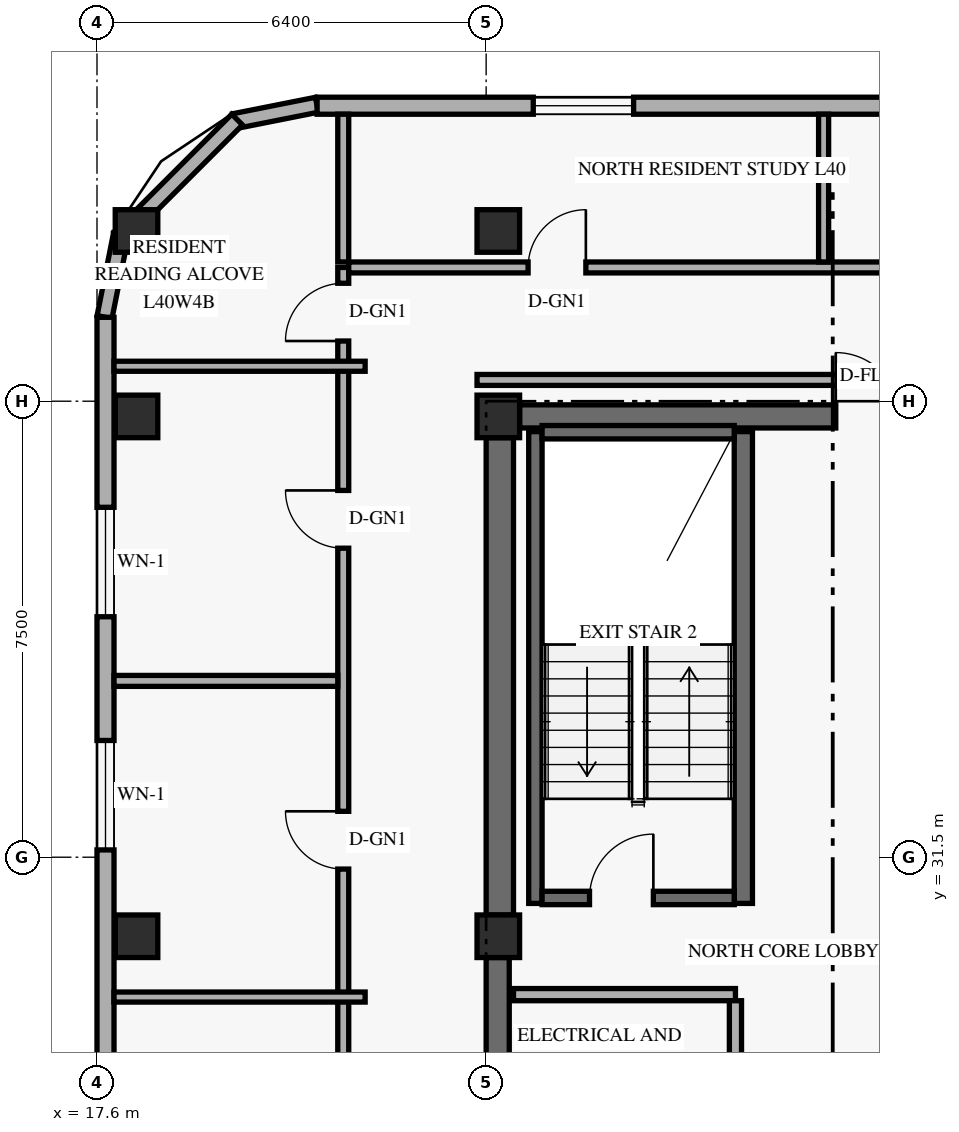
"""IFC4 building model, lengths in metres.
Left out: names, types, materials, properties, quantities, classifications, styles, units other than length and angle.
Written with IfcOpenShell. Run it as: python <this file> out.ifc"""

import sys

from ifc_helpers import new_model, si_unit, direction, frame, frame_2d, origin, origin_2d, place, context, subcontext, project, spatial, rectangle, extrude, element, fill, save


model = new_model("IFC4")
c1 = context("Model", 3, precision=1e-05, world=origin(), true_north=direction((0.0, 1.0)))
c2 = subcontext(c1, "Body", "Model", "MODEL_VIEW")
j1 = project(units=[si_unit("LENGTHUNIT", "METRE"), si_unit("PLANEANGLEUNIT", "RADIAN")], contexts=[c1])
p1 = place(None, origin())
s1 = spatial("IfcSite", under=j1, at=p1, CompositionType="ELEMENT")
p2 = place(p1, origin())
s2 = spatial("IfcBuilding", under=s1, at=p2, CompositionType="ELEMENT")
p3 = place(p2, frame((0.0, 0.0, 155.4)))
s3 = spatial("IfcBuildingStorey", under=s2, at=p3, CompositionType="ELEMENT", Elevation=155.4)
p4 = place(p3, frame((24.19, 17.9, 0.0), z_axis=(0.0, 0.0, 1.0), x_axis=(0.0, 1.0, 0.0)))
e1 = element("IfcWall", 1, at=p4, inside=s3, PredefinedType="SHEAR", context=c2, shape_type="SweptSolid", body=[
    extrude(rectangle(XDim=11.95, YDim=0.38, at=frame_2d((5.975, 0.0))), origin(), (0.0, 0.0, 1.0), 2.748),
])
p5 = place(p3, frame((24.225, 30.55, 0.0), z_axis=(0.0, 0.0, 1.0), x_axis=(0.0, 1.0, 0.0)))
e2 = element("IfcWall", 2, at=p5, inside=s3, PredefinedType="SHEAR", context=c2, shape_type="SweptSolid", body=[
    extrude(rectangle(XDim=7.85, YDim=0.45, at=frame_2d((3.925, 0.0))), origin(), (0.0, 0.0, 1.0), 2.748),
])
p6 = place(p3, frame((24.55, 38.75, 0.0), z_axis=(0.0, 0.0, 1.0), x_axis=(1.0, 0.0, 0.0)))
e3 = element("IfcWall", 3, at=p6, inside=s3, PredefinedType="SHEAR", context=c2, shape_type="SweptSolid", body=[
    extrude(rectangle(XDim=10.3, YDim=0.38, at=frame_2d((5.15, 0.0))), origin(), (0.0, 0.0, 1.0), 3.36),
])
p7 = place(p6, frame((5.2, 0.0, 0.0)))
e4 = element("IfcOpeningElement", 4, at=p7, cuts=e3, PredefinedType="OPENING", context=c2, shape_type="SweptSolid", body=[
    extrude(rectangle(XDim=1.05, YDim=2.15, at=frame_2d((0.525, 1.075))), frame((0.0, 0.2, 0.0), z_axis=(0.0, -1.0, 0.0), x_axis=(1.0, 0.0, 0.0)), (0.0, 0.0, 1.0), 0.4),
])
p8 = place(p3, frame((24.81, 30.74, 0.0), z_axis=(0.0, 0.0, 1.0), x_axis=(0.0, 1.0, 0.0)))
e5 = element("IfcWall", 5, at=p8, inside=s3, PredefinedType="SHEAR", context=c2, shape_type="SweptSolid", body=[
    extrude(rectangle(XDim=7.76, YDim=0.22, at=frame_2d((3.88, 0.0))), origin(), (0.0, 0.0, 1.0), 3.36),
])
p9 = place(p3, frame((28.23, 30.74, 0.0), z_axis=(0.0, 0.0, 1.0), x_axis=(0.0, 1.0, 0.0)))
e6 = element("IfcWall", 6, at=p9, inside=s3, PredefinedType="SHEAR", context=c2, shape_type="SweptSolid", body=[
    extrude(rectangle(XDim=7.76, YDim=0.3, at=frame_2d((3.88, 0.0))), origin(), (0.0, 0.0, 1.0), 3.36),
])
p10 = place(p3, frame((24.92, 30.83, 0.0), z_axis=(0.0, 0.0, 1.0), x_axis=(1.0, 0.0, 0.0)))
e7 = element("IfcWall", 7, at=p10, inside=s3, PredefinedType="SHEAR", context=c2, shape_type="SweptSolid", body=[
    extrude(rectangle(XDim=3.16, YDim=0.22, at=frame_2d((1.58, 0.0))), origin(), (0.0, 0.0, 1.0), 3.36),
])
p11 = place(p10, frame((0.78, 0.0, 0.0)))
e8 = element("IfcOpeningElement", 8, at=p11, cuts=e7, PredefinedType="OPENING", context=c2, shape_type="SweptSolid", body=[
    extrude(rectangle(XDim=1.05, YDim=2.15, at=frame_2d((0.525, 1.075))), frame((0.0, 0.12, 0.0), z_axis=(0.0, -1.0, 0.0), x_axis=(1.0, 0.0, 0.0)), (0.0, 0.0, 1.0), 0.24),
])
p12 = place(p3, frame((24.92, 38.49, 0.0), z_axis=(0.0, 0.0, 1.0), x_axis=(1.0, 0.0, 0.0)))
e9 = element("IfcWall", 9, at=p12, inside=s3, PredefinedType="SHEAR", context=c2, shape_type="SweptSolid", body=[
    extrude(rectangle(XDim=3.16, YDim=0.22, at=frame_2d((1.58, 0.0))), origin(), (0.0, 0.0, 1.0), 3.36),
])
for number, where, z_axis, x_axis in (
    (10, (18.25, 30.2, 0.0), (0.0, 0.0, 1.0), (1.0, 0.0, 0.0)),
    (11, (18.25, 38.75, 0.0), (0.0, 0.0, 1.0), (1.0, 0.0, 0.0)),
    (12, (18.25, 41.8, 0.0), (0.0, 0.0, 1.0), (1.0, 0.0, 0.0)),
    (13, (24.2, 30.2, 0.0), (0.0, 0.0, 1.0), (1.0, 0.0, 0.0)),
    (14, (24.2, 38.75, 0.0), (0.0, 0.0, 1.0), (1.0, 0.0, 0.0)),
    (15, (24.2, 41.8, 0.0), (0.0, 0.0, 1.0), (1.0, 0.0, 0.0)),
):
    element("IfcColumn", number, at=place(p3, frame(where, z_axis=z_axis, x_axis=x_axis)), inside=s3, PredefinedType="COLUMN", context=c2, shape_type="SweptSolid", body=[
        extrude(rectangle(XDim=0.7, YDim=0.7, at=origin_2d()), origin(), (0.0, 0.0, 1.0), 3.6),
    ])
p13 = place(p3, frame((21.217, 43.876, 0.0), z_axis=(0.0, 0.0, 1.0), x_axis=(-0.980809899341, -0.19496651342, 0.0)))
e16 = element("IfcWall", 16, at=p13, inside=s3, PredefinedType="SOLIDWALL", context=c2, shape_type="SweptSolid", body=[
    extrude(rectangle(XDim=1.389, YDim=0.25, at=frame_2d((0.694, 0.0))), origin(), (0.0, 0.0, 1.0), 3.36),
])
p14 = place(p3, frame((19.905, 43.632, 0.0), z_axis=(0.0, 0.0, 1.0), x_axis=(-0.707106781187, -0.707106781187, 0.0)))
e17 = element("IfcWall", 17, at=p14, inside=s3, PredefinedType="SOLIDWALL", context=c2, shape_type="SweptSolid", body=[
    extrude(rectangle(XDim=2.739, YDim=0.25, at=frame_2d((1.37, 0.0))), origin(), (0.0, 0.0, 1.0), 3.36),
])
p15 = place(p3, frame((17.995, 41.746, 0.0), z_axis=(0.0, 0.0, 1.0), x_axis=(-0.195135625965, -0.9807762678, 0.0)))
e18 = element("IfcWall", 18, at=p15, inside=s3, PredefinedType="SOLIDWALL", context=c2, shape_type="SweptSolid", body=[
    extrude(rectangle(XDim=1.389, YDim=0.25, at=frame_2d((0.694, 0.0))), origin(), (0.0, 0.0, 1.0), 3.36),
])
p16 = place(p3, frame((54.98, 43.86, 0.0), z_axis=(0.0, 0.0, 1.0), x_axis=(-1.0, 0.0, 0.0)))
e19 = element("IfcWall", 19, at=p16, inside=s3, PredefinedType="SOLIDWALL", context=c2, shape_type="SweptSolid", body=[
    extrude(rectangle(XDim=33.76, YDim=0.28, at=frame_2d((16.88, 0.0))), origin(), (0.0, 0.0, 1.0), 3.36),
])
p17 = place(p16, frame((28.555, 0.0, 0.85)))
e20 = element("IfcOpeningElement", 20, at=p17, cuts=e19, PredefinedType="OPENING", context=c2, shape_type="SweptSolid", body=[
    extrude(rectangle(XDim=1.65, YDim=1.6, at=frame_2d((0.825, 0.8))), frame((0.0, 0.15, 0.0), z_axis=(0.0, -1.0, 0.0), x_axis=(1.0, 0.0, 0.0)), (0.0, 0.0, 1.0), 0.3),
])
p18 = place(p16, frame((21.67, 0.0, 0.85)))
e21 = element("IfcOpeningElement", 21, at=p18, cuts=e19, PredefinedType="OPENING", context=c2, shape_type="SweptSolid", body=[
    extrude(rectangle(XDim=1.65, YDim=1.6, at=frame_2d((0.825, 0.8))), frame((0.0, 0.15, 0.0), z_axis=(0.0, -1.0, 0.0), x_axis=(1.0, 0.0, 0.0)), (0.0, 0.0, 1.0), 0.3),
])
p19 = place(p16, frame((14.996, 0.0, 0.85)))
e22 = element("IfcOpeningElement", 22, at=p19, cuts=e19, PredefinedType="OPENING", context=c2, shape_type="SweptSolid", body=[
    extrude(rectangle(XDim=1.65, YDim=1.6, at=frame_2d((0.825, 0.8))), frame((0.0, 0.15, 0.0), z_axis=(0.0, -1.0, 0.0), x_axis=(1.0, 0.0, 0.0)), (0.0, 0.0, 1.0), 0.3),
])
p20 = place(p16, frame((7.806, 0.0, 0.85)))
e23 = element("IfcOpeningElement", 23, at=p20, cuts=e19, PredefinedType="OPENING", context=c2, shape_type="SweptSolid", body=[
    extrude(rectangle(XDim=1.65, YDim=1.6, at=frame_2d((0.825, 0.8))), frame((0.0, 0.15, 0.0), z_axis=(0.0, -1.0, 0.0), x_axis=(1.0, 0.0, 0.0)), (0.0, 0.0, 1.0), 0.3),
])
p21 = place(p16, frame((1.765, 0.0, 0.85)))
e24 = element("IfcOpeningElement", 24, at=p21, cuts=e19, PredefinedType="OPENING", context=c2, shape_type="SweptSolid", body=[
    extrude(rectangle(XDim=1.65, YDim=1.6, at=frame_2d((0.825, 0.8))), frame((0.0, 0.15, 0.0), z_axis=(0.0, -1.0, 0.0), x_axis=(1.0, 0.0, 0.0)), (0.0, 0.0, 1.0), 0.3),
])
p22 = place(p3, frame((17.74, 40.38, 0.0), z_axis=(0.0, 0.0, 1.0), x_axis=(0.0, -1.0, 0.0)))
e25 = element("IfcWall", 25, at=p22, inside=s3, PredefinedType="SOLIDWALL", context=c2, shape_type="SweptSolid", body=[
    extrude(rectangle(XDim=32.76, YDim=0.28, at=frame_2d((16.38, 0.0))), origin(), (0.0, 0.0, 1.0), 3.36),
])
p23 = place(p22, frame((27.835, 0.0, 0.85)))
e26 = element("IfcOpeningElement", 26, at=p23, cuts=e25, PredefinedType="OPENING", context=c2, shape_type="SweptSolid", body=[
    extrude(rectangle(XDim=1.8, YDim=1.6, at=frame_2d((0.9, 0.8))), frame((0.0, 0.15, 0.0), z_axis=(0.0, -1.0, 0.0), x_axis=(1.0, 0.0, 0.0)), (0.0, 0.0, 1.0), 0.3),
])
p24 = place(p22, frame((24.125, 0.0, 0.85)))
e27 = element("IfcOpeningElement", 27, at=p24, cuts=e25, PredefinedType="OPENING", context=c2, shape_type="SweptSolid", body=[
    extrude(rectangle(XDim=1.8, YDim=1.6, at=frame_2d((0.9, 0.8))), frame((0.0, 0.15, 0.0), z_axis=(0.0, -1.0, 0.0), x_axis=(1.0, 0.0, 0.0)), (0.0, 0.0, 1.0), 0.3),
])
p25 = place(p22, frame((18.305, 0.0, 0.85)))
e28 = element("IfcOpeningElement", 28, at=p25, cuts=e25, PredefinedType="OPENING", context=c2, shape_type="SweptSolid", body=[
    extrude(rectangle(XDim=1.8, YDim=1.6, at=frame_2d((0.9, 0.8))), frame((0.0, 0.15, 0.0), z_axis=(0.0, -1.0, 0.0), x_axis=(1.0, 0.0, 0.0)), (0.0, 0.0, 1.0), 0.3),
])
p26 = place(p22, frame((12.88, 0.0, 0.85)))
e29 = element("IfcOpeningElement", 29, at=p26, cuts=e25, PredefinedType="OPENING", context=c2, shape_type="SweptSolid", body=[
    extrude(rectangle(XDim=1.8, YDim=1.6, at=frame_2d((0.9, 0.8))), frame((0.0, 0.15, 0.0), z_axis=(0.0, -1.0, 0.0), x_axis=(1.0, 0.0, 0.0)), (0.0, 0.0, 1.0), 0.3),
])
p27 = place(p22, frame((6.96, 0.0, 0.85)))
e30 = element("IfcOpeningElement", 30, at=p27, cuts=e25, PredefinedType="OPENING", context=c2, shape_type="SweptSolid", body=[
    extrude(rectangle(XDim=1.8, YDim=1.6, at=frame_2d((0.9, 0.8))), frame((0.0, 0.15, 0.0), z_axis=(0.0, -1.0, 0.0), x_axis=(1.0, 0.0, 0.0)), (0.0, 0.0, 1.0), 0.3),
])
p28 = place(p22, frame((3.125, 0.0, 0.85)))
e31 = element("IfcOpeningElement", 31, at=p28, cuts=e25, PredefinedType="OPENING", context=c2, shape_type="SweptSolid", body=[
    extrude(rectangle(XDim=1.8, YDim=1.6, at=frame_2d((0.9, 0.8))), frame((0.0, 0.15, 0.0), z_axis=(0.0, -1.0, 0.0), x_axis=(1.0, 0.0, 0.0)), (0.0, 0.0, 1.0), 0.3),
])
p29 = place(p3, frame((24.45, 29.24, 0.0), z_axis=(0.0, 0.0, 1.0), x_axis=(1.0, 0.0, 0.0)))
e32 = element("IfcWall", 32, at=p29, inside=s3, PredefinedType="STANDARD", context=c2, shape_type="SweptSolid", body=[
    extrude(rectangle(XDim=3.65, YDim=0.2, at=frame_2d((1.825, 0.0))), origin(), (0.0, 0.0, 1.0), 3.36),
])
p30 = place(p3, frame((28.1, 24.39, 0.0), z_axis=(0.0, 0.0, 1.0), x_axis=(0.0, 1.0, 0.0)))
e33 = element("IfcWall", 33, at=p30, inside=s3, PredefinedType="STANDARD", context=c2, shape_type="SweptSolid", body=[
    extrude(rectangle(XDim=4.75, YDim=0.2, at=frame_2d((2.375, 0.0))), origin(), (0.0, 0.0, 1.0), 3.36),
])
p31 = place(p30, frame((1.86, 0.0, 0.0)))
e34 = element("IfcOpeningElement", 34, at=p31, cuts=e33, PredefinedType="OPENING", context=c2, shape_type="SweptSolid", body=[
    extrude(rectangle(XDim=0.9, YDim=2.1, at=frame_2d((0.45, 1.05))), frame((0.0, 0.11, 0.0), z_axis=(0.0, -1.0, 0.0), x_axis=(1.0, 0.0, 0.0)), (0.0, 0.0, 1.0), 0.22),
])
p32 = place(p3, frame((21.65, 6.8, 0.0), z_axis=(0.0, 0.0, 1.0), x_axis=(0.0, 1.0, 0.0)))
e35 = element("IfcWall", 35, at=p32, inside=s3, PredefinedType="STANDARD", context=c2, shape_type="SweptSolid", body=[
    extrude(rectangle(XDim=34.4, YDim=0.18, at=frame_2d((17.2, 0.0))), origin(), (0.0, 0.0, 1.0), 2.73),
])
p33 = place(p32, frame((0.3, 0.0, 0.0)))
e36 = element("IfcOpeningElement", 36, at=p33, cuts=e35, PredefinedType="OPENING", context=c2, shape_type="SweptSolid", body=[
    extrude(rectangle(XDim=0.95, YDim=2.15, at=frame_2d((0.475, 1.075))), frame((0.0, 0.1, 0.0), z_axis=(0.0, -1.0, 0.0), x_axis=(1.0, 0.0, 0.0)), (0.0, 0.0, 1.0), 0.2),
])
p34 = place(p32, frame((4.167, 0.0, 0.0)))
e37 = element("IfcOpeningElement", 37, at=p34, cuts=e35, PredefinedType="OPENING", context=c2, shape_type="SweptSolid", body=[
    extrude(rectangle(XDim=0.95, YDim=2.15, at=frame_2d((0.475, 1.075))), frame((0.0, 0.1, 0.0), z_axis=(0.0, -1.0, 0.0), x_axis=(1.0, 0.0, 0.0)), (0.0, 0.0, 1.0), 0.2),
])
p35 = place(p32, frame((8.77, 0.0, 0.0)))
e38 = element("IfcOpeningElement", 38, at=p35, cuts=e35, PredefinedType="OPENING", context=c2, shape_type="SweptSolid", body=[
    extrude(rectangle(XDim=0.95, YDim=2.15, at=frame_2d((0.475, 1.075))), frame((0.0, 0.1, 0.0), z_axis=(0.0, -1.0, 0.0), x_axis=(1.0, 0.0, 0.0)), (0.0, 0.0, 1.0), 0.2),
])
p36 = place(p32, frame((13.88, 0.0, 0.0)))
e39 = element("IfcOpeningElement", 39, at=p36, cuts=e35, PredefinedType="OPENING", context=c2, shape_type="SweptSolid", body=[
    extrude(rectangle(XDim=0.95, YDim=2.15, at=frame_2d((0.475, 1.075))), frame((0.0, 0.1, 0.0), z_axis=(0.0, -1.0, 0.0), x_axis=(1.0, 0.0, 0.0)), (0.0, 0.0, 1.0), 0.2),
])
p37 = place(p32, frame((19.395, 0.0, 0.0)))
e40 = element("IfcOpeningElement", 40, at=p37, cuts=e35, PredefinedType="OPENING", context=c2, shape_type="SweptSolid", body=[
    extrude(rectangle(XDim=0.95, YDim=2.15, at=frame_2d((0.475, 1.075))), frame((0.0, 0.1, 0.0), z_axis=(0.0, -1.0, 0.0), x_axis=(1.0, 0.0, 0.0)), (0.0, 0.0, 1.0), 0.2),
])
p38 = place(p32, frame((24.505, 0.0, 0.0)))
e41 = element("IfcOpeningElement", 41, at=p38, cuts=e35, PredefinedType="OPENING", context=c2, shape_type="SweptSolid", body=[
    extrude(rectangle(XDim=0.95, YDim=2.15, at=frame_2d((0.475, 1.075))), frame((0.0, 0.1, 0.0), z_axis=(0.0, -1.0, 0.0), x_axis=(1.0, 0.0, 0.0)), (0.0, 0.0, 1.0), 0.2),
])
p39 = place(p32, frame((29.782, 0.0, 0.0)))
e42 = element("IfcOpeningElement", 42, at=p39, cuts=e35, PredefinedType="OPENING", context=c2, shape_type="SweptSolid", body=[
    extrude(rectangle(XDim=0.95, YDim=2.15, at=frame_2d((0.475, 1.075))), frame((0.0, 0.1, 0.0), z_axis=(0.0, -1.0, 0.0), x_axis=(1.0, 0.0, 0.0)), (0.0, 0.0, 1.0), 0.2),
])
p40 = place(p32, frame((33.19, 0.0, 0.0)))
e43 = element("IfcOpeningElement", 43, at=p40, cuts=e35, PredefinedType="OPENING", context=c2, shape_type="SweptSolid", body=[
    extrude(rectangle(XDim=0.95, YDim=2.15, at=frame_2d((0.475, 1.075))), frame((0.0, 0.1, 0.0), z_axis=(0.0, -1.0, 0.0), x_axis=(1.0, 0.0, 0.0)), (0.0, 0.0, 1.0), 0.2),
])
p41 = place(p3, frame((21.74, 41.2, 0.0), z_axis=(0.0, 0.0, 1.0), x_axis=(1.0, 0.0, 0.0)))
e44 = element("IfcWall", 44, at=p41, inside=s3, PredefinedType="STANDARD", context=c2, shape_type="SweptSolid", body=[
    extrude(rectangle(XDim=13.68, YDim=0.18, at=frame_2d((6.84, 0.0))), origin(), (0.0, 0.0, 1.0), 2.73),
])
p42 = place(p41, frame((2.95, 0.0, 0.0)))
e45 = element("IfcOpeningElement", 45, at=p42, cuts=e44, PredefinedType="OPENING", context=c2, shape_type="SweptSolid", body=[
    extrude(rectangle(XDim=0.95, YDim=2.15, at=frame_2d((0.475, 1.075))), frame((0.0, 0.1, 0.0), z_axis=(0.0, -1.0, 0.0), x_axis=(1.0, 0.0, 0.0)), (0.0, 0.0, 1.0), 0.2),
])
p43 = place(p41, frame((10.11, 0.0, 0.0)))
e46 = element("IfcOpeningElement", 46, at=p43, cuts=e44, PredefinedType="OPENING", context=c2, shape_type="SweptSolid", body=[
    extrude(rectangle(XDim=0.95, YDim=2.15, at=frame_2d((0.475, 1.075))), frame((0.0, 0.1, 0.0), z_axis=(0.0, -1.0, 0.0), x_axis=(1.0, 0.0, 0.0)), (0.0, 0.0, 1.0), 0.2),
])
p44 = place(p3, frame((23.85, 39.35, 0.0), z_axis=(0.0, 0.0, 1.0), x_axis=(1.0, 0.0, 0.0)))
e47 = element("IfcWall", 47, at=p44, inside=s3, PredefinedType="STANDARD", context=c2, shape_type="SweptSolid", body=[
    extrude(rectangle(XDim=11.57, YDim=0.18, at=frame_2d((5.785, 0.0))), origin(), (0.0, 0.0, 1.0), 2.73),
])
p45 = place(p3, frame((21.65, 41.29, 0.0), z_axis=(0.0, 0.0, 1.0), x_axis=(0.0, 1.0, 0.0)))
e48 = element("IfcWall", 48, at=p45, inside=s3, PredefinedType="PARTITIONING", context=c2, shape_type="SweptSolid", body=[
    extrude(rectangle(XDim=2.43, YDim=0.18, at=frame_2d((1.215, 0.0))), origin(), (0.0, 0.0, 1.0), 2.879),
])
p46 = place(p3, frame((17.88, 29.2, 0.0), z_axis=(0.0, 0.0, 1.0), x_axis=(1.0, 0.0, 0.0)))
e49 = element("IfcWall", 49, at=p46, inside=s3, PredefinedType="PARTITIONING", context=c2, shape_type="SweptSolid", body=[
    extrude(rectangle(XDim=4.13, YDim=0.165, at=frame_2d((2.065, 0.0))), origin(), (0.0, 0.0, 1.0), 2.879),
])
p47 = place(p3, frame((17.88, 34.4, 0.0), z_axis=(0.0, 0.0, 1.0), x_axis=(1.0, 0.0, 0.0)))
e50 = element("IfcWall", 50, at=p47, inside=s3, PredefinedType="PARTITIONING", context=c2, shape_type="SweptSolid", body=[
    extrude(rectangle(XDim=3.68, YDim=0.18, at=frame_2d((1.84, 0.0))), origin(), (0.0, 0.0, 1.0), 2.879),
])
p48 = place(p3, frame((17.88, 39.575, 0.0), z_axis=(0.0, 0.0, 1.0), x_axis=(1.0, 0.0, 0.0)))
e51 = element("IfcWall", 51, at=p48, inside=s3, PredefinedType="PARTITIONING", context=c2, shape_type="SweptSolid", body=[
    extrude(rectangle(XDim=4.13, YDim=0.165, at=frame_2d((2.065, 0.0))), origin(), (0.0, 0.0, 1.0), 2.879),
])
p49 = place(p3, frame((29.55, 41.29, 0.0), z_axis=(0.0, 0.0, 1.0), x_axis=(0.0, 1.0, 0.0)))
e52 = element("IfcWall", 52, at=p49, inside=s3, PredefinedType="PARTITIONING", context=c2, shape_type="SweptSolid", body=[
    extrude(rectangle(XDim=2.43, YDim=0.165, at=frame_2d((1.215, 0.0))), origin(), (0.0, 0.0, 1.0), 2.879),
])
p50 = place(p17, origin())
e53 = element("IfcWindow", 53, at=p50, inside=s3, PartitioningType="SINGLE_PANEL", PredefinedType="WINDOW", context=c2, shape_type="SweptSolid", body=[
    extrude(rectangle(XDim=1.65, YDim=1.6, at=frame_2d((0.825, 0.8))), frame((0.0, 0.03, 0.0), z_axis=(0.0, -1.0, 0.0), x_axis=(1.0, 0.0, 0.0)), (0.0, 0.0, 1.0), 0.06),
])
fill(e20, e53)
p51 = place(p27, origin())
e54 = element("IfcWindow", 54, at=p51, inside=s3, PartitioningType="SINGLE_PANEL", PredefinedType="WINDOW", context=c2, shape_type="SweptSolid", body=[
    extrude(rectangle(XDim=1.8, YDim=1.6, at=frame_2d((0.9, 0.8))), frame((0.0, 0.03, 0.0), z_axis=(0.0, -1.0, 0.0), x_axis=(1.0, 0.0, 0.0)), (0.0, 0.0, 1.0), 0.06),
])
fill(e30, e54)
p52 = place(p28, origin())
e55 = element("IfcWindow", 55, at=p52, inside=s3, PartitioningType="SINGLE_PANEL", PredefinedType="WINDOW", context=c2, shape_type="SweptSolid", body=[
    extrude(rectangle(XDim=1.8, YDim=1.6, at=frame_2d((0.9, 0.8))), frame((0.0, 0.03, 0.0), z_axis=(0.0, -1.0, 0.0), x_axis=(1.0, 0.0, 0.0)), (0.0, 0.0, 1.0), 0.06),
])
fill(e31, e55)
p53 = place(p11, origin())
e56 = element("IfcDoor", 56, at=p53, inside=s3, OperationType="SINGLE_SWING_RIGHT", PredefinedType="DOOR", context=c2, shape_type="SweptSolid", body=[
    extrude(rectangle(XDim=1.05, YDim=2.15, at=frame_2d((0.525, 1.075))), frame((0.0, 0.025, 0.0), z_axis=(0.0, -1.0, 0.0), x_axis=(1.0, 0.0, 0.0)), (0.0, 0.0, 1.0), 0.05),
])
fill(e8, e56)
p54 = place(p7, frame((1.05, 0.0, 0.0), z_axis=(0.0, 0.0, 1.0), x_axis=(-1.0, 0.0, 0.0)))
e57 = element("IfcDoor", 57, at=p54, inside=s3, OperationType="SINGLE_SWING_RIGHT", PredefinedType="DOOR", context=c2, shape_type="SweptSolid", body=[
    extrude(rectangle(XDim=1.05, YDim=2.15, at=frame_2d((0.525, 1.075))), frame((0.0, 0.025, 0.0), z_axis=(0.0, -1.0, 0.0), x_axis=(1.0, 0.0, 0.0)), (0.0, 0.0, 1.0), 0.05),
])
fill(e4, e57)
p55 = place(p38, origin())
e58 = element("IfcDoor", 58, at=p55, inside=s3, OperationType="SINGLE_SWING_RIGHT", PredefinedType="DOOR", context=c2, shape_type="SweptSolid", body=[
    extrude(rectangle(XDim=0.95, YDim=2.15, at=frame_2d((0.475, 1.075))), frame((0.0, 0.025, 0.0), z_axis=(0.0, -1.0, 0.0), x_axis=(1.0, 0.0, 0.0)), (0.0, 0.0, 1.0), 0.05),
])
fill(e41, e58)
p56 = place(p39, origin())
e59 = element("IfcDoor", 59, at=p56, inside=s3, OperationType="SINGLE_SWING_RIGHT", PredefinedType="DOOR", context=c2, shape_type="SweptSolid", body=[
    extrude(rectangle(XDim=0.95, YDim=2.15, at=frame_2d((0.475, 1.075))), frame((0.0, 0.025, 0.0), z_axis=(0.0, -1.0, 0.0), x_axis=(1.0, 0.0, 0.0)), (0.0, 0.0, 1.0), 0.05),
])
fill(e42, e59)
p57 = place(p40, origin())
e60 = element("IfcDoor", 60, at=p57, inside=s3, OperationType="SINGLE_SWING_LEFT", PredefinedType="DOOR", context=c2, shape_type="SweptSolid", body=[
    extrude(rectangle(XDim=0.95, YDim=2.15, at=frame_2d((0.475, 1.075))), frame((0.0, 0.025, 0.0), z_axis=(0.0, -1.0, 0.0), x_axis=(1.0, 0.0, 0.0)), (0.0, 0.0, 1.0), 0.05),
])
fill(e43, e60)
p58 = place(p42, origin())
e61 = element("IfcDoor", 61, at=p58, inside=s3, OperationType="SINGLE_SWING_RIGHT", PredefinedType="DOOR", context=c2, shape_type="SweptSolid", body=[
    extrude(rectangle(XDim=0.95, YDim=2.15, at=frame_2d((0.475, 1.075))), frame((0.0, 0.025, 0.0), z_axis=(0.0, -1.0, 0.0), x_axis=(1.0, 0.0, 0.0)), (0.0, 0.0, 1.0), 0.05),
])
fill(e45, e61)
save(model, sys.argv[1])
